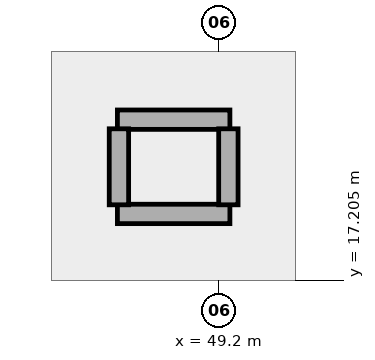
"""IFC4 building model, lengths in metres.
Left out: names, types, materials, properties, quantities, classifications, styles, units other than length and angle.
Written with IfcOpenShell. Run it as: python <this file> out.ifc"""

import sys

from ifc_helpers import new_model, si_unit, direction, frame, frame_2d, origin, place, context, subcontext, project, spatial, rectangle, extrude, element, save


model = new_model("IFC4")
c1 = context("Model", 3, precision=1e-05, world=origin(), true_north=direction((0.0, 1.0)))
c2 = subcontext(c1, "Body", "Model", "MODEL_VIEW")
j1 = project(units=[si_unit("LENGTHUNIT", "METRE"), si_unit("PLANEANGLEUNIT", "RADIAN")], contexts=[c1])
p1 = place(None, origin())
s1 = spatial("IfcSite", under=j1, at=p1, CompositionType="ELEMENT")
p2 = place(p1, origin())
s2 = spatial("IfcBuilding", under=s1, at=p2, CompositionType="ELEMENT")
p3 = place(p2, frame((0.0, 0.0, 15.6)))
s3 = spatial("IfcBuildingStorey", under=s2, at=p3, CompositionType="ELEMENT", Elevation=15.6)
for number, where, z_axis, x_axis in (
    (1, (47.86, 19.32, 0.0), (0.0, 0.0, 1.0), (1.0, 0.0, 0.0)),
    (2, (47.86, 18.08, 0.0), (0.0, 0.0, 1.0), (1.0, 0.0, 0.0)),
):
    element("IfcWall", number, at=place(p3, frame(where, z_axis=z_axis, x_axis=x_axis)), inside=s3, PredefinedType="PARTITIONING", context=c2, shape_type="SweptSolid", body=[
        extrude(rectangle(XDim=1.48, YDim=0.255, at=frame_2d((0.74, 0.0))), origin(), (0.0, 0.0, 1.0), 4.72),
    ])
for number, where, z_axis, x_axis in (
    (3, (47.88, 18.2, 0.0), (0.0, 0.0, 1.0), (0.0, 1.0, 0.0)),
    (4, (49.32, 18.2, 0.0), (0.0, 0.0, 1.0), (0.0, 1.0, 0.0)),
):
    element("IfcWall", number, at=place(p3, frame(where, z_axis=z_axis, x_axis=x_axis)), inside=s3, PredefinedType="PARTITIONING", context=c2, shape_type="SweptSolid", body=[
        extrude(rectangle(XDim=1.0, YDim=0.255, at=frame_2d((0.5, 0.0))), origin(), (0.0, 0.0, 1.0), 4.72),
    ])
save(model, sys.argv[1])
